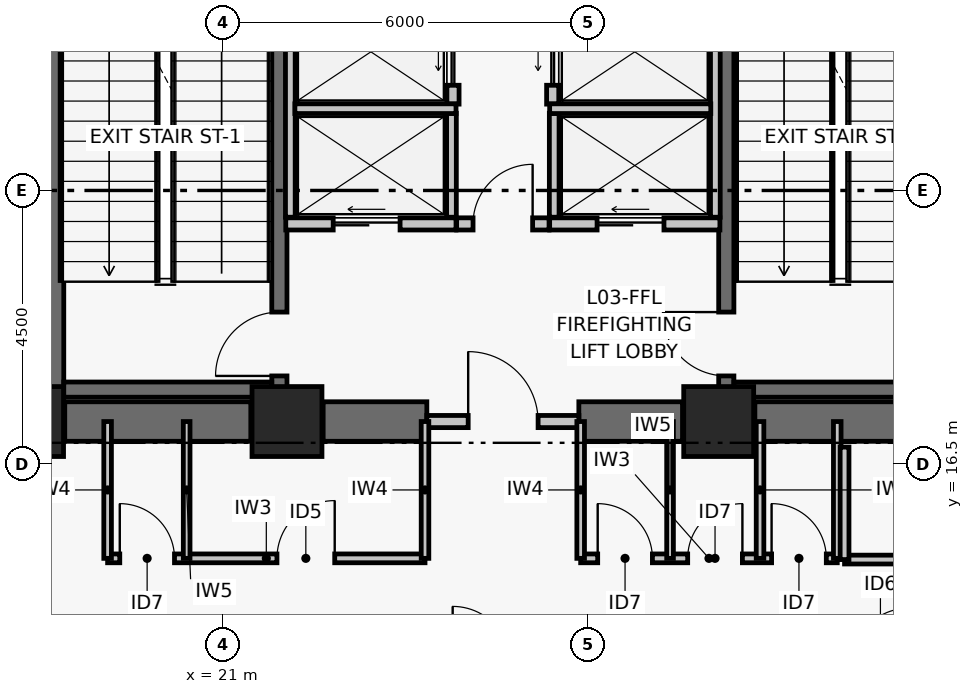
"""IFC4 building model, lengths in metres.
Left out: names, types, materials, properties, quantities, classifications, styles, units other than length and angle.
Written with IfcOpenShell. Run it as: python <this file> out.ifc"""

import sys

from ifc_helpers import new_model, si_unit, direction, frame, frame_2d, origin, origin_2d, place, context, subcontext, project, spatial, rectangle, extrude, element, fill, save


model = new_model("IFC4")
c1 = context("Model", 3, precision=1e-05, world=origin(), true_north=direction((0.0, 1.0)))
c2 = subcontext(c1, "Body", "Model", "MODEL_VIEW")
j1 = project(units=[si_unit("LENGTHUNIT", "METRE"), si_unit("PLANEANGLEUNIT", "RADIAN")], contexts=[c1])
p1 = place(None, origin())
s1 = spatial("IfcSite", under=j1, at=p1, CompositionType="ELEMENT")
p2 = place(p1, origin())
s2 = spatial("IfcBuilding", under=s1, at=p2, CompositionType="ELEMENT")
p3 = place(p2, frame((0.0, 0.0, 18.0)))
s3 = spatial("IfcBuildingStorey", under=s2, at=p3, CompositionType="ELEMENT", Elevation=18.0)
for number, where, z_axis, x_axis in (
    (1, (17.8, 17.2, 0.0), (0.0, 0.0, 1.0), (1.0, 0.0, 0.0)),
    (2, (22.05, 17.2, 0.0), (0.0, 0.0, 1.0), (1.0, 0.0, 0.0)),
    (3, (29.15, 17.2, 0.0), (0.0, 0.0, 1.0), (1.0, 0.0, 0.0)),
):
    element("IfcColumn", number, at=place(p3, frame(where, z_axis=z_axis, x_axis=x_axis)), inside=s3, PredefinedType="COLUMN", context=c2, shape_type="SweptSolid", body=[
        extrude(rectangle(XDim=1.15, YDim=1.15, at=origin_2d()), origin(), (0.0, 0.0, 1.0), 4.8),
    ])
p4 = place(p3, frame((18.395, 17.2, 0.0), z_axis=(0.0, 0.0, 1.0), x_axis=(1.0, 0.0, 0.0)))
e4 = element("IfcWall", 4, at=p4, inside=s3, PredefinedType="SHEAR", context=c2, shape_type="SweptSolid", body=[
    extrude(rectangle(XDim=3.06, YDim=0.65, at=frame_2d((1.53, 0.0))), origin(), (0.0, 0.0, 1.0), 4.48),
])
p5 = place(p3, frame((22.645, 17.2, 0.0), z_axis=(0.0, 0.0, 1.0), x_axis=(1.0, 0.0, 0.0)))
e5 = element("IfcWall", 5, at=p5, inside=s3, PredefinedType="SHEAR", context=c2, shape_type="SweptSolid", body=[
    extrude(rectangle(XDim=1.705, YDim=0.65, at=frame_2d((0.853, 0.0))), origin(), (0.0, 0.0, 1.0), 4.48),
])
p6 = place(p3, frame((26.85, 17.2, 0.0), z_axis=(0.0, 0.0, 1.0), x_axis=(1.0, 0.0, 0.0)))
e6 = element("IfcWall", 6, at=p6, inside=s3, PredefinedType="SHEAR", context=c2, shape_type="SweptSolid", body=[
    extrude(rectangle(XDim=1.705, YDim=0.65, at=frame_2d((0.853, 0.0))), origin(), (0.0, 0.0, 1.0), 4.48),
])
p7 = place(p3, frame((29.745, 17.2, 0.0), z_axis=(0.0, 0.0, 1.0), x_axis=(1.0, 0.0, 0.0)))
e7 = element("IfcWall", 7, at=p7, inside=s3, PredefinedType="SHEAR", context=c2, shape_type="SweptSolid", body=[
    extrude(rectangle(XDim=3.06, YDim=0.65, at=frame_2d((1.53, 0.0))), origin(), (0.0, 0.0, 1.0), 4.48),
])
p8 = place(p3, frame((18.254, 17.6, 0.0), z_axis=(0.0, 0.0, 1.0), x_axis=(0.0, 1.0, 0.0)))
e8 = element("IfcWall", 8, at=p8, inside=s3, PredefinedType="SHEAR", context=c2, shape_type="SweptSolid", body=[
    extrude(rectangle(XDim=8.8, YDim=0.25, at=frame_2d((4.4, 0.0))), origin(), (0.0, 0.0, 1.0), 4.48),
])
p9 = place(p3, frame((21.925, 17.6, 0.0), z_axis=(0.0, 0.0, 1.0), x_axis=(0.0, 1.0, 0.0)))
e9 = element("IfcWall", 9, at=p9, inside=s3, PredefinedType="SHEAR", context=c2, shape_type="SweptSolid", body=[
    extrude(rectangle(XDim=8.8, YDim=0.25, at=frame_2d((4.4, 0.0))), origin(), (0.0, 0.0, 1.0), 4.48),
])
p10 = place(p9, frame((0.35, 0.0, 0.0)))
e10 = element("IfcOpeningElement", 10, at=p10, cuts=e9, PredefinedType="OPENING", context=c2, shape_type="SweptSolid", body=[
    extrude(rectangle(XDim=1.05, YDim=2.08, at=frame_2d((0.525, 1.04))), frame((0.0, 0.135, 0.0), z_axis=(0.0, -1.0, 0.0), x_axis=(1.0, 0.0, 0.0)), (0.0, 0.0, 1.0), 0.27),
])
p11 = place(p3, frame((18.379, 17.725, 0.0), z_axis=(0.0, 0.0, 1.0), x_axis=(1.0, 0.0, 0.0)))
e11 = element("IfcWall", 11, at=p11, inside=s3, PredefinedType="SHEAR", context=c2, shape_type="SweptSolid", body=[
    extrude(rectangle(XDim=3.421, YDim=0.25, at=frame_2d((1.71, 0.0))), origin(), (0.0, 0.0, 1.0), 4.48),
])
p12 = place(p3, frame((29.275, 17.6, 0.0), z_axis=(0.0, 0.0, 1.0), x_axis=(0.0, 1.0, 0.0)))
e12 = element("IfcWall", 12, at=p12, inside=s3, PredefinedType="SHEAR", context=c2, shape_type="SweptSolid", body=[
    extrude(rectangle(XDim=8.8, YDim=0.25, at=frame_2d((4.4, 0.0))), origin(), (0.0, 0.0, 1.0), 4.48),
])
p13 = place(p12, frame((0.35, 0.0, 0.0)))
e13 = element("IfcOpeningElement", 13, at=p13, cuts=e12, PredefinedType="OPENING", context=c2, shape_type="SweptSolid", body=[
    extrude(rectangle(XDim=1.05, YDim=2.08, at=frame_2d((0.525, 1.04))), frame((0.0, 0.135, 0.0), z_axis=(0.0, -1.0, 0.0), x_axis=(1.0, 0.0, 0.0)), (0.0, 0.0, 1.0), 0.27),
])
p14 = place(p3, frame((29.4, 17.725, 0.0), z_axis=(0.0, 0.0, 1.0), x_axis=(1.0, 0.0, 0.0)))
e14 = element("IfcWall", 14, at=p14, inside=s3, PredefinedType="SHEAR", context=c2, shape_type="SweptSolid", body=[
    extrude(rectangle(XDim=3.421, YDim=0.25, at=frame_2d((1.71, 0.0))), origin(), (0.0, 0.0, 1.0), 4.48),
])
p15 = place(p3, frame((24.35, 17.2, 0.0), z_axis=(0.0, 0.0, 1.0), x_axis=(1.0, 0.0, 0.0)))
e15 = element("IfcWall", 15, at=p15, inside=s3, PredefinedType="PARTITIONING", context=c2, shape_type="SweptSolid", body=[
    extrude(rectangle(XDim=2.5, YDim=0.2, at=frame_2d((1.25, 0.0))), origin(), (0.0, 0.0, 1.0), 3.61),
])
p16 = place(p15, frame((0.68, 0.0, 0.0)))
e16 = element("IfcOpeningElement", 16, at=p16, cuts=e15, PredefinedType="OPENING", context=c2, shape_type="SweptSolid", body=[
    extrude(rectangle(XDim=1.15, YDim=2.08, at=frame_2d((0.575, 1.04))), frame((0.0, 0.11, 0.0), z_axis=(0.0, -1.0, 0.0), x_axis=(1.0, 0.0, 0.0)), (0.0, 0.0, 1.0), 0.22),
])
p17 = place(p3, frame((24.84, 20.45, 0.0), z_axis=(0.0, 0.0, 1.0), x_axis=(1.0, 0.0, 0.0)))
e17 = element("IfcWall", 17, at=p17, inside=s3, PredefinedType="PARTITIONING", context=c2, shape_type="SweptSolid", body=[
    extrude(rectangle(XDim=1.52, YDim=0.2, at=frame_2d((0.76, 0.0))), origin(), (0.0, 0.0, 1.0), 4.48),
])
p18 = place(p17, frame((0.27, 0.0, 0.0)))
e18 = element("IfcOpeningElement", 18, at=p18, cuts=e17, PredefinedType="OPENING", context=c2, shape_type="SweptSolid", body=[
    extrude(rectangle(XDim=0.98, YDim=2.06, at=frame_2d((0.49, 1.03))), frame((0.0, 0.11, 0.0), z_axis=(0.0, -1.0, 0.0), x_axis=(1.0, 0.0, 0.0)), (0.0, 0.0, 1.0), 0.22),
])
p19 = place(p3, frame((22.03, 20.45, 0.0), z_axis=(0.0, 0.0, 1.0), x_axis=(1.0, 0.0, 0.0)))
e19 = element("IfcWall", 19, at=p19, inside=s3, PredefinedType="PARTITIONING", context=c2, shape_type="SweptSolid", body=[
    extrude(rectangle(XDim=2.8, YDim=0.2, at=frame_2d((1.4, 0.0))), origin(), (0.0, 0.0, 1.0), 4.48),
])
p20 = place(p19, frame((0.78, 0.0, 0.0)))
e20 = element("IfcOpeningElement", 20, at=p20, cuts=e19, PredefinedType="OPENING", context=c2, shape_type="SweptSolid", body=[
    extrude(rectangle(XDim=1.1, YDim=2.08, at=frame_2d((0.55, 1.04))), frame((0.0, 0.11, 0.0), z_axis=(0.0, -1.0, 0.0), x_axis=(1.0, 0.0, 0.0)), (0.0, 0.0, 1.0), 0.22),
])
p21 = place(p3, frame((26.37, 20.45, 0.0), z_axis=(0.0, 0.0, 1.0), x_axis=(1.0, 0.0, 0.0)))
e21 = element("IfcWall", 21, at=p21, inside=s3, PredefinedType="PARTITIONING", context=c2, shape_type="SweptSolid", body=[
    extrude(rectangle(XDim=2.8, YDim=0.2, at=frame_2d((1.4, 0.0))), origin(), (0.0, 0.0, 1.0), 4.48),
])
p22 = place(p21, frame((0.78, 0.0, 0.0)))
e22 = element("IfcOpeningElement", 22, at=p22, cuts=e21, PredefinedType="OPENING", context=c2, shape_type="SweptSolid", body=[
    extrude(rectangle(XDim=1.1, YDim=2.08, at=frame_2d((0.55, 1.04))), frame((0.0, 0.11, 0.0), z_axis=(0.0, -1.0, 0.0), x_axis=(1.0, 0.0, 0.0)), (0.0, 0.0, 1.0), 0.22),
])
p23 = place(p3, frame((24.78, 22.42, 0.0), z_axis=(0.0, 0.0, 1.0), x_axis=(0.0, 1.0, 0.0)))
e23 = element("IfcWall", 23, at=p23, inside=s3, PredefinedType="PARTITIONING", context=c2, shape_type="SweptSolid", body=[
    extrude(rectangle(XDim=1.72, YDim=0.2, at=frame_2d((0.86, 0.0))), origin(), (0.0, 0.0, 1.0), 4.48),
])
p24 = place(p23, frame((0.31, 0.0, 0.0)))
e24 = element("IfcOpeningElement", 24, at=p24, cuts=e23, PredefinedType="OPENING", context=c2, shape_type="SweptSolid", body=[
    extrude(rectangle(XDim=1.1, YDim=2.08, at=frame_2d((0.55, 1.04))), frame((0.0, 0.11, 0.0), z_axis=(0.0, -1.0, 0.0), x_axis=(1.0, 0.0, 0.0)), (0.0, 0.0, 1.0), 0.22),
])
p25 = place(p3, frame((26.42, 22.42, 0.0), z_axis=(0.0, 0.0, 1.0), x_axis=(0.0, 1.0, 0.0)))
e25 = element("IfcWall", 25, at=p25, inside=s3, PredefinedType="PARTITIONING", context=c2, shape_type="SweptSolid", body=[
    extrude(rectangle(XDim=1.72, YDim=0.2, at=frame_2d((0.86, 0.0))), origin(), (0.0, 0.0, 1.0), 4.48),
])
p26 = place(p25, frame((0.31, 0.0, 0.0)))
e26 = element("IfcOpeningElement", 26, at=p26, cuts=e25, PredefinedType="OPENING", context=c2, shape_type="SweptSolid", body=[
    extrude(rectangle(XDim=1.1, YDim=2.08, at=frame_2d((0.55, 1.04))), frame((0.0, 0.11, 0.0), z_axis=(0.0, -1.0, 0.0), x_axis=(1.0, 0.0, 0.0)), (0.0, 0.0, 1.0), 0.22),
])
p27 = place(p3, frame((22.105, 20.56, 0.0), z_axis=(0.0, 0.0, 1.0), x_axis=(0.0, 1.0, 0.0)))
e27 = element("IfcWall", 27, at=p27, inside=s3, PredefinedType="PARTITIONING", context=c2, shape_type="SweptSolid", body=[
    extrude(rectangle(XDim=5.45, YDim=0.16, at=frame_2d((2.725, 0.0))), origin(), (0.0, 0.0, 1.0), 4.48),
])
p28 = place(p3, frame((24.755, 20.56, 0.0), z_axis=(0.0, 0.0, 1.0), x_axis=(0.0, 1.0, 0.0)))
e28 = element("IfcWall", 28, at=p28, inside=s3, PredefinedType="PARTITIONING", context=c2, shape_type="SweptSolid", body=[
    extrude(rectangle(XDim=1.71, YDim=0.16, at=frame_2d((0.855, 0.0))), origin(), (0.0, 0.0, 1.0), 4.48),
])
p29 = place(p3, frame((22.18, 22.345, 0.0), z_axis=(0.0, 0.0, 1.0), x_axis=(1.0, 0.0, 0.0)))
e29 = element("IfcWall", 29, at=p29, inside=s3, PredefinedType="PARTITIONING", context=c2, shape_type="SweptSolid", body=[
    extrude(rectangle(XDim=2.65, YDim=0.16, at=frame_2d((1.325, 0.0))), origin(), (0.0, 0.0, 1.0), 4.48),
])
p30 = place(p3, frame((29.095, 20.56, 0.0), z_axis=(0.0, 0.0, 1.0), x_axis=(0.0, 1.0, 0.0)))
e30 = element("IfcWall", 30, at=p30, inside=s3, PredefinedType="PARTITIONING", context=c2, shape_type="SweptSolid", body=[
    extrude(rectangle(XDim=5.45, YDim=0.16, at=frame_2d((2.725, 0.0))), origin(), (0.0, 0.0, 1.0), 4.48),
])
p31 = place(p3, frame((26.445, 20.56, 0.0), z_axis=(0.0, 0.0, 1.0), x_axis=(0.0, 1.0, 0.0)))
e31 = element("IfcWall", 31, at=p31, inside=s3, PredefinedType="PARTITIONING", context=c2, shape_type="SweptSolid", body=[
    extrude(rectangle(XDim=1.71, YDim=0.16, at=frame_2d((0.855, 0.0))), origin(), (0.0, 0.0, 1.0), 4.48),
])
p32 = place(p3, frame((26.37, 22.345, 0.0), z_axis=(0.0, 0.0, 1.0), x_axis=(1.0, 0.0, 0.0)))
e32 = element("IfcWall", 32, at=p32, inside=s3, PredefinedType="PARTITIONING", context=c2, shape_type="SweptSolid", body=[
    extrude(rectangle(XDim=2.65, YDim=0.16, at=frame_2d((1.325, 0.0))), origin(), (0.0, 0.0, 1.0), 4.48),
])
p33 = place(p3, frame((19.1, 14.95, 0.0), z_axis=(0.0, 0.0, 1.0), x_axis=(1.0, 0.0, 0.0)))
e33 = element("IfcWall", 33, at=p33, inside=s3, PredefinedType="PARTITIONING", context=c2, shape_type="SweptSolid", body=[
    extrude(rectangle(XDim=5.22, YDim=0.145, at=frame_2d((2.61, 0.0))), origin(), (0.0, 0.0, 1.0), 3.56),
])
p34 = place(p33, frame((0.2, 0.0, 0.0)))
e34 = element("IfcOpeningElement", 34, at=p34, cuts=e33, PredefinedType="OPENING", context=c2, shape_type="SweptSolid", body=[
    extrude(rectangle(XDim=0.9, YDim=2.02, at=frame_2d((0.45, 1.01))), frame((0.0, 0.083, 0.0), z_axis=(0.0, -1.0, 0.0), x_axis=(1.0, 0.0, 0.0)), (0.0, 0.0, 1.0), 0.165),
])
p35 = place(p33, frame((2.785, 0.0, 0.0)))
e35 = element("IfcOpeningElement", 35, at=p35, cuts=e33, PredefinedType="OPENING", context=c2, shape_type="SweptSolid", body=[
    extrude(rectangle(XDim=0.95, YDim=2.06, at=frame_2d((0.475, 1.03))), frame((0.0, 0.083, 0.0), z_axis=(0.0, -1.0, 0.0), x_axis=(1.0, 0.0, 0.0)), (0.0, 0.0, 1.0), 0.165),
])
p36 = place(p3, frame((26.88, 14.95, 0.0), z_axis=(0.0, 0.0, 1.0), x_axis=(1.0, 0.0, 0.0)))
e36 = element("IfcWall", 36, at=p36, inside=s3, PredefinedType="PARTITIONING", context=c2, shape_type="SweptSolid", body=[
    extrude(rectangle(XDim=4.22, YDim=0.145, at=frame_2d((2.11, 0.0))), origin(), (0.0, 0.0, 1.0), 4.01),
])
p37 = place(p36, frame((0.28, 0.0, 0.0)))
e37 = element("IfcOpeningElement", 37, at=p37, cuts=e36, PredefinedType="OPENING", context=c2, shape_type="SweptSolid", body=[
    extrude(rectangle(XDim=0.9, YDim=2.02, at=frame_2d((0.45, 1.01))), frame((0.0, 0.083, 0.0), z_axis=(0.0, -1.0, 0.0), x_axis=(1.0, 0.0, 0.0)), (0.0, 0.0, 1.0), 0.165),
])
p38 = place(p36, frame((1.76, 0.0, 0.0)))
e38 = element("IfcOpeningElement", 38, at=p38, cuts=e36, PredefinedType="OPENING", context=c2, shape_type="SweptSolid", body=[
    extrude(rectangle(XDim=0.9, YDim=2.02, at=frame_2d((0.45, 1.01))), frame((0.0, 0.083, 0.0), z_axis=(0.0, -1.0, 0.0), x_axis=(1.0, 0.0, 0.0)), (0.0, 0.0, 1.0), 0.165),
])
p39 = place(p36, frame((3.14, 0.0, 0.0)))
e39 = element("IfcOpeningElement", 39, at=p39, cuts=e36, PredefinedType="OPENING", context=c2, shape_type="SweptSolid", body=[
    extrude(rectangle(XDim=0.9, YDim=2.02, at=frame_2d((0.45, 1.01))), frame((0.0, 0.083, 0.0), z_axis=(0.0, -1.0, 0.0), x_axis=(1.0, 0.0, 0.0)), (0.0, 0.0, 1.0), 0.165),
])
p40 = place(p3, frame((19.1, 14.95, 0.0), z_axis=(0.0, 0.0, 1.0), x_axis=(0.0, 1.0, 0.0)))
e40 = element("IfcWall", 40, at=p40, inside=s3, PredefinedType="PARTITIONING", context=c2, shape_type="SweptSolid", body=[
    extrude(rectangle(XDim=2.25, YDim=0.125, at=frame_2d((1.125, 0.0))), origin(), (0.0, 0.0, 1.0), 3.61),
])
p41 = place(p3, frame((20.4, 14.95, 0.0), z_axis=(0.0, 0.0, 1.0), x_axis=(0.0, 1.0, 0.0)))
e41 = element("IfcWall", 41, at=p41, inside=s3, PredefinedType="PARTITIONING", context=c2, shape_type="SweptSolid", body=[
    extrude(rectangle(XDim=2.25, YDim=0.11, at=frame_2d((1.125, 0.0))), origin(), (0.0, 0.0, 1.0), 3.61),
])
for number, where, z_axis, x_axis in (
    (42, (24.32, 14.95, 0.0), (0.0, 0.0, 1.0), (0.0, 1.0, 0.0)),
    (43, (26.88, 14.95, 0.0), (0.0, 0.0, 1.0), (0.0, 1.0, 0.0)),
):
    element("IfcWall", number, at=place(p3, frame(where, z_axis=z_axis, x_axis=x_axis)), inside=s3, PredefinedType="PARTITIONING", context=c2, shape_type="SweptSolid", body=[
        extrude(rectangle(XDim=2.25, YDim=0.125, at=frame_2d((1.125, 0.0))), origin(), (0.0, 0.0, 1.0), 3.61),
    ])
p42 = place(p3, frame((28.35, 14.95, 0.0), z_axis=(0.0, 0.0, 1.0), x_axis=(0.0, 1.0, 0.0)))
e44 = element("IfcWall", 44, at=p42, inside=s3, PredefinedType="PARTITIONING", context=c2, shape_type="SweptSolid", body=[
    extrude(rectangle(XDim=2.25, YDim=0.11, at=frame_2d((1.125, 0.0))), origin(), (0.0, 0.0, 1.0), 3.61),
])
for number, where, z_axis, x_axis in (
    (45, (29.83, 14.95, 0.0), (0.0, 0.0, 1.0), (0.0, 1.0, 0.0)),
    (46, (31.1, 14.95, 0.0), (0.0, 0.0, 1.0), (0.0, 1.0, 0.0)),
):
    element("IfcWall", number, at=place(p3, frame(where, z_axis=z_axis, x_axis=x_axis)), inside=s3, PredefinedType="PARTITIONING", context=c2, shape_type="SweptSolid", body=[
        extrude(rectangle(XDim=2.25, YDim=0.125, at=frame_2d((1.125, 0.0))), origin(), (0.0, 0.0, 1.0), 3.61),
    ])
p43 = place(p3, frame((32.8, 14.93, 0.0), z_axis=(0.0, 0.0, 1.0), x_axis=(-1.0, 0.0, 0.0)))
e47 = element("IfcWall", 47, at=p43, inside=s3, PredefinedType="PARTITIONING", context=c2, shape_type="SweptSolid", body=[
    extrude(rectangle(XDim=1.58, YDim=0.145, at=frame_2d((0.79, 0.0))), origin(), (0.0, 0.0, 1.0), 4.01),
])
p44 = place(p3, frame((31.22, 14.93, 0.0), z_axis=(0.0, 0.0, 1.0), x_axis=(0.0, 1.0, 0.0)))
e48 = element("IfcWall", 48, at=p44, inside=s3, PredefinedType="PARTITIONING", context=c2, shape_type="SweptSolid", body=[
    extrude(rectangle(XDim=1.85, YDim=0.145, at=frame_2d((0.925, 0.0))), origin(), (0.0, 0.0, 1.0), 3.61),
])
p45 = place(p10, origin())
e49 = element("IfcDoor", 49, at=p45, inside=s3, OperationType="SINGLE_SWING_LEFT", PredefinedType="DOOR", context=c2, shape_type="SweptSolid", body=[
    extrude(rectangle(XDim=1.05, YDim=2.08, at=frame_2d((0.525, 1.04))), frame((0.0, 0.025, 0.0), z_axis=(0.0, -1.0, 0.0), x_axis=(1.0, 0.0, 0.0)), (0.0, 0.0, 1.0), 0.05),
])
fill(e10, e49)
p46 = place(p13, origin())
e50 = element("IfcDoor", 50, at=p46, inside=s3, OperationType="SINGLE_SWING_RIGHT", PredefinedType="DOOR", context=c2, shape_type="SweptSolid", body=[
    extrude(rectangle(XDim=1.05, YDim=2.08, at=frame_2d((0.525, 1.04))), frame((0.0, 0.025, 0.0), z_axis=(0.0, -1.0, 0.0), x_axis=(1.0, 0.0, 0.0)), (0.0, 0.0, 1.0), 0.05),
])
fill(e13, e50)
p47 = place(p16, origin())
e51 = element("IfcDoor", 51, at=p47, inside=s3, OperationType="SINGLE_SWING_LEFT", PredefinedType="DOOR", context=c2, shape_type="SweptSolid", body=[
    extrude(rectangle(XDim=1.15, YDim=2.08, at=frame_2d((0.575, 1.04))), frame((0.0, 0.025, 0.0), z_axis=(0.0, -1.0, 0.0), x_axis=(1.0, 0.0, 0.0)), (0.0, 0.0, 1.0), 0.05),
])
fill(e16, e51)
p48 = place(p18, origin())
e52 = element("IfcDoor", 52, at=p48, inside=s3, OperationType="SINGLE_SWING_RIGHT", PredefinedType="DOOR", context=c2, shape_type="SweptSolid", body=[
    extrude(rectangle(XDim=0.98, YDim=2.06, at=frame_2d((0.49, 1.03))), frame((0.0, 0.025, 0.0), z_axis=(0.0, -1.0, 0.0), x_axis=(1.0, 0.0, 0.0)), (0.0, 0.0, 1.0), 0.05),
])
fill(e18, e52)
p49 = place(p20, origin())
e53 = element("IfcDoor", 53, at=p49, inside=s3, OperationType="DOUBLE_DOOR_SLIDING", PredefinedType="DOOR", context=c2, shape_type="SweptSolid", body=[
    extrude(rectangle(XDim=1.1, YDim=2.08, at=frame_2d((0.55, 1.04))), frame((0.0, 0.025, 0.0), z_axis=(0.0, -1.0, 0.0), x_axis=(1.0, 0.0, 0.0)), (0.0, 0.0, 1.0), 0.05),
])
fill(e20, e53)
p50 = place(p22, origin())
e54 = element("IfcDoor", 54, at=p50, inside=s3, OperationType="DOUBLE_DOOR_SLIDING", PredefinedType="DOOR", context=c2, shape_type="SweptSolid", body=[
    extrude(rectangle(XDim=1.1, YDim=2.08, at=frame_2d((0.55, 1.04))), frame((0.0, 0.025, 0.0), z_axis=(0.0, -1.0, 0.0), x_axis=(1.0, 0.0, 0.0)), (0.0, 0.0, 1.0), 0.05),
])
fill(e22, e54)
p51 = place(p24, origin())
e55 = element("IfcDoor", 55, at=p51, inside=s3, OperationType="DOUBLE_DOOR_SLIDING", PredefinedType="DOOR", context=c2, shape_type="SweptSolid", body=[
    extrude(rectangle(XDim=1.1, YDim=2.08, at=frame_2d((0.55, 1.04))), frame((0.0, 0.025, 0.0), z_axis=(0.0, -1.0, 0.0), x_axis=(1.0, 0.0, 0.0)), (0.0, 0.0, 1.0), 0.05),
])
fill(e24, e55)
p52 = place(p26, origin())
e56 = element("IfcDoor", 56, at=p52, inside=s3, OperationType="DOUBLE_DOOR_SLIDING", PredefinedType="DOOR", context=c2, shape_type="SweptSolid", body=[
    extrude(rectangle(XDim=1.1, YDim=2.08, at=frame_2d((0.55, 1.04))), frame((0.0, 0.025, 0.0), z_axis=(0.0, -1.0, 0.0), x_axis=(1.0, 0.0, 0.0)), (0.0, 0.0, 1.0), 0.05),
])
fill(e26, e56)
p53 = place(p34, origin())
e57 = element("IfcDoor", 57, at=p53, inside=s3, OperationType="SINGLE_SWING_LEFT", PredefinedType="DOOR", context=c2, shape_type="SweptSolid", body=[
    extrude(rectangle(XDim=0.9, YDim=2.02, at=frame_2d((0.45, 1.01))), frame((0.0, 0.025, 0.0), z_axis=(0.0, -1.0, 0.0), x_axis=(1.0, 0.0, 0.0)), (0.0, 0.0, 1.0), 0.05),
])
fill(e34, e57)
p54 = place(p35, origin())
e58 = element("IfcDoor", 58, at=p54, inside=s3, OperationType="SINGLE_SWING_RIGHT", PredefinedType="DOOR", context=c2, shape_type="SweptSolid", body=[
    extrude(rectangle(XDim=0.95, YDim=2.06, at=frame_2d((0.475, 1.03))), frame((0.0, 0.025, 0.0), z_axis=(0.0, -1.0, 0.0), x_axis=(1.0, 0.0, 0.0)), (0.0, 0.0, 1.0), 0.05),
])
fill(e35, e58)
p55 = place(p37, origin())
e59 = element("IfcDoor", 59, at=p55, inside=s3, OperationType="SINGLE_SWING_LEFT", PredefinedType="DOOR", context=c2, shape_type="SweptSolid", body=[
    extrude(rectangle(XDim=0.9, YDim=2.02, at=frame_2d((0.45, 1.01))), frame((0.0, 0.025, 0.0), z_axis=(0.0, -1.0, 0.0), x_axis=(1.0, 0.0, 0.0)), (0.0, 0.0, 1.0), 0.05),
])
fill(e37, e59)
p56 = place(p38, origin())
e60 = element("IfcDoor", 60, at=p56, inside=s3, OperationType="SINGLE_SWING_RIGHT", PredefinedType="DOOR", context=c2, shape_type="SweptSolid", body=[
    extrude(rectangle(XDim=0.9, YDim=2.02, at=frame_2d((0.45, 1.01))), frame((0.0, 0.025, 0.0), z_axis=(0.0, -1.0, 0.0), x_axis=(1.0, 0.0, 0.0)), (0.0, 0.0, 1.0), 0.05),
])
fill(e38, e60)
p57 = place(p39, origin())
e61 = element("IfcDoor", 61, at=p57, inside=s3, OperationType="SINGLE_SWING_LEFT", PredefinedType="DOOR", context=c2, shape_type="SweptSolid", body=[
    extrude(rectangle(XDim=0.9, YDim=2.02, at=frame_2d((0.45, 1.01))), frame((0.0, 0.025, 0.0), z_axis=(0.0, -1.0, 0.0), x_axis=(1.0, 0.0, 0.0)), (0.0, 0.0, 1.0), 0.05),
])
fill(e39, e61)
save(model, sys.argv[1])
